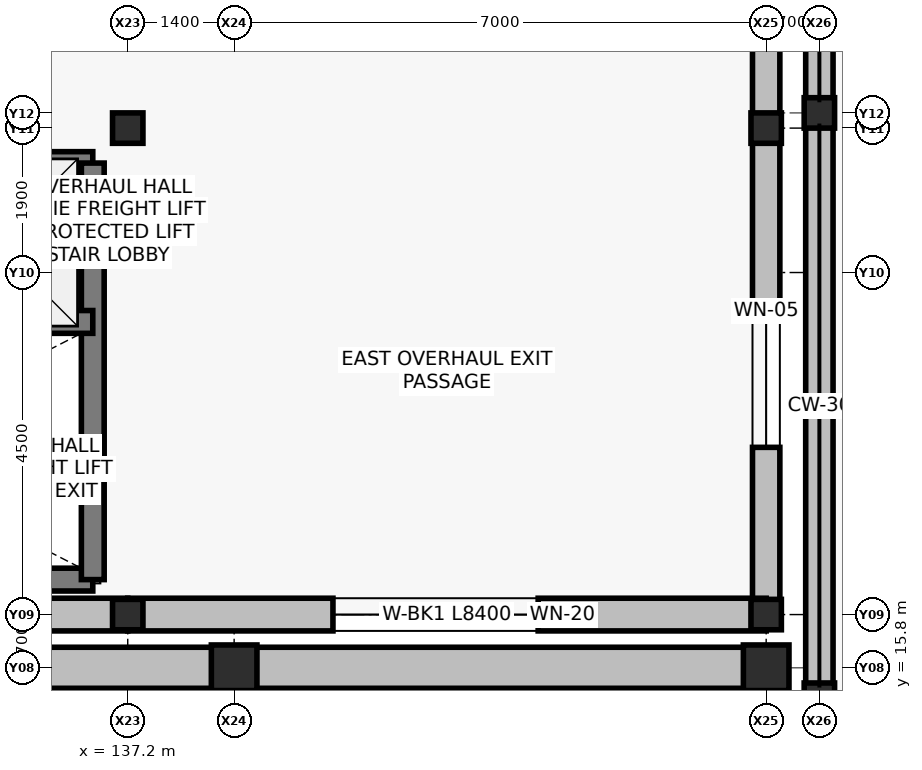
"""IFC4 building model, lengths in metres.
Left out: names, types, materials, properties, quantities, classifications, styles, units other than length and angle.
Written with IfcOpenShell. Run it as: python <this file> out.ifc"""

import sys

from ifc_helpers import new_model, si_unit, direction, frame, frame_2d, origin, origin_2d, place, context, subcontext, project, spatial, rectangle, i_section, extrude, element, fill, save


model = new_model("IFC4")
c1 = context("Model", 3, precision=1e-05, world=origin(), true_north=direction((0.0, 1.0)))
c2 = subcontext(c1, "Body", "Model", "MODEL_VIEW")
j1 = project(units=[si_unit("LENGTHUNIT", "METRE"), si_unit("PLANEANGLEUNIT", "RADIAN")], contexts=[c1])
p1 = place(None, origin())
s1 = spatial("IfcSite", under=j1, at=p1, CompositionType="ELEMENT")
p2 = place(p1, origin())
s2 = spatial("IfcBuilding", under=s1, at=p2, CompositionType="ELEMENT")
p3 = place(p2, origin())
s3 = spatial("IfcBuildingStorey", under=s2, at=p3, CompositionType="ELEMENT", Elevation=0.0)
for number, where, z_axis, x_axis in (
    (1, (137.2, 16.5, -0.35), (0.0, 0.0, 1.0), (1.0, 0.0, 0.0)),
    (2, (137.2, 22.9, -0.35), (0.0, 0.0, 1.0), (1.0, 0.0, 0.0)),
    (3, (145.6, 16.5, -0.35), (0.0, 0.0, 1.0), (1.0, 0.0, 0.0)),
    (4, (145.6, 22.9, -0.35), (0.0, 0.0, 1.0), (1.0, 0.0, 0.0)),
    (5, (146.3, 15.4, -0.35), (0.0, 0.0, 1.0), (1.0, 0.0, 0.0)),
    (6, (146.3, 23.1, -0.35), (0.0, 0.0, 1.0), (1.0, 0.0, 0.0)),
):
    element("IfcColumn", number, at=place(p3, frame(where, z_axis=z_axis, x_axis=x_axis)), inside=s3, PredefinedType="COLUMN", context=c2, shape_type="SweptSolid", body=[
        extrude(i_section(OverallWidth=0.4, OverallDepth=0.4, WebThickness=0.013, FlangeThickness=0.021, at=origin_2d()), origin(), (0.0, 0.0, 1.0), 6.35),
    ])
for number, where, z_axis, x_axis in (
    (7, (138.6, 15.8, -0.35), (0.0, 0.0, 1.0), (1.0, 0.0, 0.0)),
    (8, (145.6, 15.8, -0.35), (0.0, 0.0, 1.0), (1.0, 0.0, 0.0)),
):
    element("IfcColumn", number, at=place(p3, frame(where, z_axis=z_axis, x_axis=x_axis)), inside=s3, PredefinedType="COLUMN", context=c2, shape_type="SweptSolid", body=[
        extrude(rectangle(XDim=0.6, YDim=0.6, at=origin_2d()), origin(), (0.0, 0.0, 1.0), 6.35),
    ])
p4 = place(p3, frame((145.6, 16.5, 0.0), z_axis=(0.0, 0.0, 1.0), x_axis=(0.0, 1.0, 0.0)))
e9 = element("IfcWall", 9, at=p4, inside=s3, PredefinedType="SOLIDWALL", context=c2, shape_type="SweptSolid", body=[
    extrude(rectangle(XDim=38.4, YDim=0.36, at=frame_2d((19.2, 0.0))), origin(), (0.0, 0.0, 1.0), 5.14),
])
p5 = place(p4, frame((20.5, 0.0, 0.0)))
e10 = element("IfcOpeningElement", 10, at=p5, cuts=e9, PredefinedType="OPENING", context=c2, shape_type="SweptSolid", body=[
    extrude(rectangle(XDim=3.8, YDim=4.4, at=frame_2d((1.9, 2.2))), frame((0.0, 0.19, 0.0), z_axis=(0.0, -1.0, 0.0), x_axis=(1.0, 0.0, 0.0)), (0.0, 0.0, 1.0), 0.38),
])
p6 = place(p4, frame((2.2, 0.0, 1.2)))
e11 = element("IfcOpeningElement", 11, at=p6, cuts=e9, PredefinedType="OPENING", context=c2, shape_type="SweptSolid", body=[
    extrude(rectangle(XDim=1.8, YDim=1.8, at=frame_2d((0.9, 0.9))), frame((0.0, 0.19, 0.0), z_axis=(0.0, -1.0, 0.0), x_axis=(1.0, 0.0, 0.0)), (0.0, 0.0, 1.0), 0.38),
])
p7 = place(p4, frame((8.8, 0.0, 1.2)))
e12 = element("IfcOpeningElement", 12, at=p7, cuts=e9, PredefinedType="OPENING", context=c2, shape_type="SweptSolid", body=[
    extrude(rectangle(XDim=1.8, YDim=2.1, at=frame_2d((0.9, 1.05))), frame((0.0, 0.19, 0.0), z_axis=(0.0, -1.0, 0.0), x_axis=(1.0, 0.0, 0.0)), (0.0, 0.0, 1.0), 0.38),
])
p8 = place(p4, frame((15.2, 0.0, 1.2)))
e13 = element("IfcOpeningElement", 13, at=p8, cuts=e9, PredefinedType="OPENING", context=c2, shape_type="SweptSolid", body=[
    extrude(rectangle(XDim=2.0, YDim=1.8, at=frame_2d((1.0, 0.9))), frame((0.0, 0.19, 0.0), z_axis=(0.0, -1.0, 0.0), x_axis=(1.0, 0.0, 0.0)), (0.0, 0.0, 1.0), 0.38),
])
p9 = place(p4, frame((27.2, 0.0, 1.2)))
e14 = element("IfcOpeningElement", 14, at=p9, cuts=e9, PredefinedType="OPENING", context=c2, shape_type="SweptSolid", body=[
    extrude(rectangle(XDim=2.1, YDim=2.1, at=frame_2d((1.05, 1.05))), frame((0.0, 0.19, 0.0), z_axis=(0.0, -1.0, 0.0), x_axis=(1.0, 0.0, 0.0)), (0.0, 0.0, 1.0), 0.38),
])
p10 = place(p3, frame((128.8, 16.5, 0.0), z_axis=(0.0, 0.0, 1.0), x_axis=(1.0, 0.0, 0.0)))
e15 = element("IfcWall", 15, at=p10, inside=s3, PredefinedType="SOLIDWALL", context=c2, shape_type="SweptSolid", body=[
    extrude(rectangle(XDim=8.4, YDim=0.43, at=frame_2d((4.2, 0.0))), origin(), (0.0, 0.0, 1.0), 5.14),
])
p11 = place(p10, frame((2.7, 0.0, 1.1)))
e16 = element("IfcOpeningElement", 16, at=p11, cuts=e15, PredefinedType="OPENING", context=c2, shape_type="SweptSolid", body=[
    extrude(rectangle(XDim=1.65, YDim=1.95, at=frame_2d((0.825, 0.975))), frame((0.0, 0.225, 0.0), z_axis=(0.0, -1.0, 0.0), x_axis=(1.0, 0.0, 0.0)), (0.0, 0.0, 1.0), 0.45),
])
p12 = place(p3, frame((137.2, 16.5, 0.0), z_axis=(0.0, 0.0, 1.0), x_axis=(1.0, 0.0, 0.0)))
e17 = element("IfcWall", 17, at=p12, inside=s3, PredefinedType="SOLIDWALL", context=c2, shape_type="SweptSolid", body=[
    extrude(rectangle(XDim=8.4, YDim=0.43, at=frame_2d((4.2, 0.0))), origin(), (0.0, 0.0, 1.0), 5.14),
])
p13 = place(p12, frame((2.7, 0.0, 1.1)))
e18 = element("IfcOpeningElement", 18, at=p13, cuts=e17, PredefinedType="OPENING", context=c2, shape_type="SweptSolid", body=[
    extrude(rectangle(XDim=2.7, YDim=1.85, at=frame_2d((1.35, 0.925))), frame((0.0, 0.225, 0.0), z_axis=(0.0, -1.0, 0.0), x_axis=(1.0, 0.0, 0.0)), (0.0, 0.0, 1.0), 0.45),
])
p14 = place(p3, frame((145.6, 7.9, 0.0), z_axis=(0.0, 0.0, 1.0), x_axis=(0.0, 1.0, 0.0)))
e19 = element("IfcWall", 19, at=p14, inside=s3, PredefinedType="SOLIDWALL", context=c2, shape_type="SweptSolid", body=[
    extrude(rectangle(XDim=7.9, YDim=0.54, at=frame_2d((3.95, 0.0))), origin(), (0.0, 0.0, 1.0), 5.25),
])
for number, where, z_axis, x_axis in (
    (20, (146.3, 15.4, 0.0), (0.0, 0.0, 1.0), (0.0, 1.0, 0.0)),
    (21, (146.3, 23.1, 0.0), (0.0, 0.0, 1.0), (0.0, 1.0, 0.0)),
):
    element("IfcWall", number, at=place(p3, frame(where, z_axis=z_axis, x_axis=x_axis)), inside=s3, PredefinedType="SOLIDWALL", context=c2, shape_type="SweptSolid", body=[
        extrude(rectangle(XDim=7.7, YDim=0.36, at=frame_2d((3.85, 0.0))), origin(), (0.0, 0.0, 1.0), 2.2),
    ])
for number, where, z_axis, x_axis in (
    (22, (131.6, 15.8, 0.0), (0.0, 0.0, 1.0), (1.0, 0.0, 0.0)),
    (23, (138.6, 15.8, 0.0), (0.0, 0.0, 1.0), (1.0, 0.0, 0.0)),
):
    element("IfcWall", number, at=place(p3, frame(where, z_axis=z_axis, x_axis=x_axis)), inside=s3, PredefinedType="SOLIDWALL", context=c2, shape_type="SweptSolid", body=[
        extrude(rectangle(XDim=7.0, YDim=0.54, at=frame_2d((3.5, 0.0))), origin(), (0.0, 0.0, 1.0), 5.25),
    ])
p15 = place(p3, frame((129.26, 16.96, 0.0), z_axis=(0.0, 0.0, 1.0), x_axis=(1.0, 0.0, 0.0)))
e24 = element("IfcWall", 24, at=p15, inside=s3, PredefinedType="SHEAR", context=c2, shape_type="SweptSolid", body=[
    extrude(rectangle(XDim=7.48, YDim=0.3, at=frame_2d((3.74, 0.0))), origin(), (0.0, 0.0, 1.0), 5.72),
])
p16 = place(p3, frame((129.26, 22.44, 0.0), z_axis=(0.0, 0.0, 1.0), x_axis=(1.0, 0.0, 0.0)))
e25 = element("IfcWall", 25, at=p16, inside=s3, PredefinedType="SHEAR", context=c2, shape_type="SweptSolid", body=[
    extrude(rectangle(XDim=7.48, YDim=0.3, at=frame_2d((3.74, 0.0))), origin(), (0.0, 0.0, 1.0), 5.72),
])
p17 = place(p16, frame((0.55, 0.0, 0.0)))
e26 = element("IfcOpeningElement", 26, at=p17, cuts=e25, PredefinedType="OPENING", context=c2, shape_type="SweptSolid", body=[
    extrude(rectangle(XDim=1.5, YDim=2.2, at=frame_2d((0.75, 1.1))), frame((0.0, 0.16, 0.0), z_axis=(0.0, -1.0, 0.0), x_axis=(1.0, 0.0, 0.0)), (0.0, 0.0, 1.0), 0.32),
])
p18 = place(p3, frame((136.74, 16.96, 0.0), z_axis=(0.0, 0.0, 1.0), x_axis=(0.0, 1.0, 0.0)))
e27 = element("IfcWall", 27, at=p18, inside=s3, PredefinedType="SHEAR", context=c2, shape_type="SweptSolid", body=[
    extrude(rectangle(XDim=5.48, YDim=0.3, at=frame_2d((2.74, 0.0))), origin(), (0.0, 0.0, 1.0), 5.72),
])
p19 = place(p3, frame((129.26, 20.35, 0.0), z_axis=(0.0, 0.0, 1.0), x_axis=(1.0, 0.0, 0.0)))
e28 = element("IfcWall", 28, at=p19, inside=s3, PredefinedType="SHEAR", context=c2, shape_type="SweptSolid", body=[
    extrude(rectangle(XDim=7.48, YDim=0.3, at=frame_2d((3.74, 0.0))), origin(), (0.0, 0.0, 1.0), 5.72),
])
p20 = place(p19, frame((0.185, 0.0, 0.0)))
e29 = element("IfcOpeningElement", 29, at=p20, cuts=e28, PredefinedType="OPENING", context=c2, shape_type="SweptSolid", body=[
    extrude(rectangle(XDim=1.05, YDim=2.15, at=frame_2d((0.525, 1.075))), frame((0.0, 0.16, 0.0), z_axis=(0.0, -1.0, 0.0), x_axis=(1.0, 0.0, 0.0)), (0.0, 0.0, 1.0), 0.32),
])
p21 = place(p6, origin())
e30 = element("IfcWindow", 30, at=p21, inside=s3, PartitioningType="SINGLE_PANEL", PredefinedType="WINDOW", context=c2, shape_type="SweptSolid", body=[
    extrude(rectangle(XDim=1.8, YDim=1.8, at=frame_2d((0.9, 0.9))), frame((0.0, 0.03, 0.0), z_axis=(0.0, -1.0, 0.0), x_axis=(1.0, 0.0, 0.0)), (0.0, 0.0, 1.0), 0.06),
])
fill(e11, e30)
p22 = place(p13, origin())
e31 = element("IfcWindow", 31, at=p22, inside=s3, PartitioningType="SINGLE_PANEL", PredefinedType="WINDOW", context=c2, shape_type="SweptSolid", body=[
    extrude(rectangle(XDim=2.7, YDim=1.85, at=frame_2d((1.35, 0.925))), frame((0.0, 0.03, 0.0), z_axis=(0.0, -1.0, 0.0), x_axis=(1.0, 0.0, 0.0)), (0.0, 0.0, 1.0), 0.06),
])
fill(e18, e31)
save(model, sys.argv[1])
